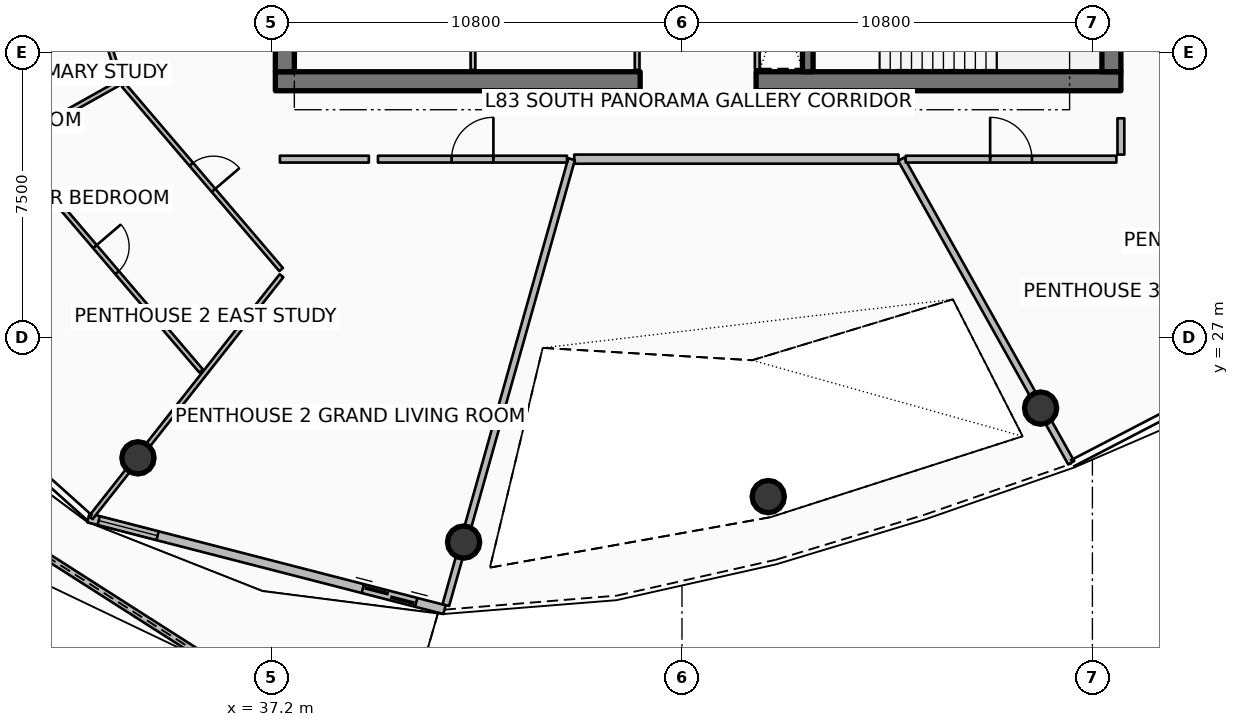
"""IFC4 building model, lengths in metres.
Left out: names, types, materials, properties, quantities, classifications, styles, units other than length and angle.
Written with IfcOpenShell. Run it as: python <this file> out.ifc"""

import sys

from ifc_helpers import new_model, si_unit, direction, frame, frame_2d, origin, origin_2d, place, context, subcontext, project, spatial, polyline, rectangle, circle, outline, extrude, element, fill, save


model = new_model("IFC4")
c1 = context("Model", 3, precision=1e-05, world=origin(), true_north=direction((0.0, 1.0)))
c2 = subcontext(c1, "Body", "Model", "MODEL_VIEW")
j1 = project(units=[si_unit("LENGTHUNIT", "METRE"), si_unit("PLANEANGLEUNIT", "RADIAN")], contexts=[c1])
p1 = place(None, origin())
s1 = spatial("IfcSite", under=j1, at=p1, CompositionType="ELEMENT")
p2 = place(p1, origin())
s2 = spatial("IfcBuilding", under=s1, at=p2, CompositionType="ELEMENT")
p3 = place(p2, frame((0.0, 0.0, 330.5)))
s3 = spatial("IfcBuildingStorey", under=s2, at=p3, CompositionType="ELEMENT", Elevation=330.5)
p4 = place(p3, frame((37.3, 33.75, 0.0), z_axis=(0.0, 0.0, 1.0), x_axis=(1.0, 0.0, 0.0)))
e1 = element("IfcWall", 1, at=p4, inside=s3, PredefinedType="SHEAR", context=c2, shape_type="SweptSolid", body=[
    extrude(rectangle(XDim=9.6, YDim=0.5, at=frame_2d((4.8, 0.0))), origin(), (0.0, 0.0, 1.0), 4.2),
])
p5 = place(p3, frame((49.95, 33.75, 0.0), z_axis=(0.0, 0.0, 1.0), x_axis=(1.0, 0.0, 0.0)))
e2 = element("IfcWall", 2, at=p5, inside=s3, PredefinedType="SHEAR", context=c2, shape_type="SweptSolid", body=[
    extrude(rectangle(XDim=9.6, YDim=0.5, at=frame_2d((4.8, 0.0))), origin(), (0.0, 0.0, 1.0), 4.2),
])
for number, where, z_axis, x_axis in (
    (3, (37.55, 34.0, 0.0), (0.0, 0.0, 1.0), (0.0, 1.0, 0.0)),
    (4, (59.3, 34.0, 0.0), (0.0, 0.0, 1.0), (0.0, 1.0, 0.0)),
):
    element("IfcWall", number, at=place(p3, frame(where, z_axis=z_axis, x_axis=x_axis)), inside=s3, PredefinedType="SHEAR", context=c2, shape_type="SweptSolid", body=[
        extrude(rectangle(XDim=16.0, YDim=0.5, at=frame_2d((8.0, 0.0))), origin(), (0.0, 0.0, 1.0), 4.2),
    ])
p6 = place(p3, frame((51.31, 34.0, 0.0), z_axis=(0.0, 0.0, 1.0), x_axis=(0.0, 1.0, 0.0)))
e5 = element("IfcWall", 5, at=p6, inside=s3, PredefinedType="SHEAR", context=c2, shape_type="SweptSolid", body=[
    extrude(rectangle(XDim=3.5, YDim=0.28, at=frame_2d((1.75, 0.0))), origin(), (0.0, 0.0, 1.0), 4.2),
])
for number, where, z_axis, x_axis in (
    (6, (33.684, 23.841, 0.0), (0.0, 0.0, 1.0), (1.0, 0.0, 0.0)),
    (7, (42.253, 21.624, 0.0), (0.0, 0.0, 1.0), (1.0, 0.0, 0.0)),
):
    element("IfcColumn", number, at=place(p3, frame(where, z_axis=z_axis, x_axis=x_axis)), inside=s3, PredefinedType="COLUMN", context=c2, shape_type="SweptSolid", body=[
        extrude(circle(Radius=0.425, at=origin_2d()), origin(), (0.0, 0.0, 1.0), 3.94),
    ])
p7 = place(p3, frame((50.27, 22.821, 0.0), z_axis=(0.0, 0.0, 1.0), x_axis=(1.0, 0.0, 0.0)))
e8 = element("IfcColumn", 8, at=p7, inside=s3, PredefinedType="COLUMN", context=c2, shape_type="SweptSolid", body=[
    extrude(circle(Radius=0.425, at=origin_2d()), origin(), (0.0, 0.0, 1.0), 4.196),
])
p8 = place(p3, frame((57.437, 25.149, 0.0), z_axis=(0.0, 0.0, 1.0), x_axis=(1.0, 0.0, 0.0)))
e9 = element("IfcColumn", 9, at=p8, inside=s3, PredefinedType="COLUMN", context=c2, shape_type="SweptSolid", body=[
    extrude(circle(Radius=0.425, at=origin_2d()), origin(), (0.0, 0.0, 1.0), 3.94),
])
p9 = place(p3, frame((27.093, 23.922, 0.0), z_axis=(0.0, 0.0, 1.0), x_axis=(0.842921526724, -0.538036522725, 0.0)))
e10 = element("IfcWall", 10, at=p9, inside=s3, PredefinedType="PARAPET", context=c2, shape_type="SweptSolid", body=[
    extrude(outline(polyline([(0.0, 0.0), (10.35, 0.0), (10.35, 1.632), (5.175, 1.418), (0.0, 1.233), (0.0, 0.0)])), frame((0.0, 0.09, 0.0), z_axis=(0.0, -1.0, 0.0), x_axis=(1.0, 0.0, 0.0)), (0.0, 0.0, 1.0), 0.18),
])
p10 = place(p3, frame((32.38, 22.26, 0.0), z_axis=(0.0, 0.0, 1.0), x_axis=(0.968389062354, -0.249444630957, 0.0)))
e11 = element("IfcWall", 11, at=p10, inside=s3, PredefinedType="SOLIDWALL", context=c2, shape_type="SweptSolid", body=[
    extrude(rectangle(XDim=9.678, YDim=0.24, at=frame_2d((4.839, 0.0))), origin(), (0.0, 0.0, 1.0), 2.89),
])
p11 = place(p10, frame((7.458, 0.0, 0.0)))
e12 = element("IfcOpeningElement", 12, at=p11, cuts=e11, PredefinedType="OPENING", context=c2, shape_type="SweptSolid", body=[
    extrude(rectangle(XDim=1.45, YDim=2.15, at=frame_2d((0.725, 1.075))), frame((0.0, 0.13, 0.0), z_axis=(0.0, -1.0, 0.0), x_axis=(1.0, 0.0, 0.0)), (0.0, 0.0, 1.0), 0.26),
])
p12 = place(p10, frame((0.28, 0.0, 0.65)))
e13 = element("IfcOpeningElement", 13, at=p12, cuts=e11, PredefinedType="OPENING", context=c2, shape_type="SweptSolid", body=[
    extrude(rectangle(XDim=1.6, YDim=1.5, at=frame_2d((0.8, 0.75))), frame((0.0, 0.13, 0.0), z_axis=(0.0, -1.0, 0.0), x_axis=(1.0, 0.0, 0.0)), (0.0, 0.0, 1.0), 0.26),
])
for number, where, z_axis, x_axis in (
    (14, (46.82, 34.05, 0.0), (0.0, 0.0, 1.0), (0.0, 1.0, 0.0)),
    (15, (42.5, 34.05, 0.0), (0.0, 0.0, 1.0), (0.0, 1.0, 0.0)),
):
    element("IfcWall", number, at=place(p3, frame(where, z_axis=z_axis, x_axis=x_axis)), inside=s3, PredefinedType="PARTITIONING", context=c2, shape_type="SweptSolid", body=[
        extrude(rectangle(XDim=2.03, YDim=0.125, at=frame_2d((1.015, 0.0))), origin(), (0.0, 0.0, 1.0), 3.38),
    ])
p13 = place(p3, frame((49.98, 34.06, 0.0), z_axis=(0.0, 0.0, 1.0), x_axis=(0.0, 1.0, 0.0)))
e16 = element("IfcWall", 16, at=p13, inside=s3, PredefinedType="PARTITIONING", context=c2, shape_type="SweptSolid", body=[
    extrude(rectangle(XDim=3.4, YDim=0.125, at=frame_2d((1.7, 0.0))), origin(), (0.0, 0.0, 1.0), 3.38),
])
p14 = place(p3, frame((45.165, 31.7, 0.0), z_axis=(0.0, 0.0, 1.0), x_axis=(1.0, 0.0, 0.0)))
e17 = element("IfcWall", 17, at=p14, inside=s3, PredefinedType="SOLIDWALL", context=c2, shape_type="SweptSolid", body=[
    extrude(rectangle(XDim=8.533, YDim=0.24, at=frame_2d((4.267, 0.0))), origin(), (0.0, 0.0, 1.0), 3.38),
])
p15 = place(p3, frame((45.095, 31.7, 0.0), z_axis=(0.0, 0.0, 1.0), x_axis=(-0.271453030279, -0.962451688321, 0.0)))
e18 = element("IfcWall", 18, at=p15, inside=s3, PredefinedType="PARTITIONING", context=c2, shape_type="SweptSolid", body=[
    extrude(rectangle(XDim=12.191, YDim=0.18, at=frame_2d((6.096, 0.0))), origin(), (0.0, 0.0, 1.0), 3.38),
])
p16 = place(p3, frame((53.768, 31.7, 0.0), z_axis=(0.0, 0.0, 1.0), x_axis=(0.488623665245, -0.872494649704, 0.0)))
e19 = element("IfcWall", 19, at=p16, inside=s3, PredefinedType="PARTITIONING", context=c2, shape_type="SweptSolid", body=[
    extrude(rectangle(XDim=9.157, YDim=0.18, at=frame_2d((4.579, 0.0))), origin(), (0.0, 0.0, 1.0), 3.38),
])
p17 = place(p3, frame((40.0, 31.7, 0.0), z_axis=(0.0, 0.0, 1.0), x_axis=(1.0, 0.0, 0.0)))
e20 = element("IfcWall", 20, at=p17, inside=s3, PredefinedType="PARTITIONING", context=c2, shape_type="SweptSolid", body=[
    extrude(rectangle(XDim=4.975, YDim=0.18, at=frame_2d((2.488, 0.0))), origin(), (0.0, 0.0, 1.0), 3.38),
])
p18 = place(p17, frame((1.938, 0.0, 0.0)))
e21 = element("IfcOpeningElement", 21, at=p18, cuts=e20, PredefinedType="OPENING", context=c2, shape_type="SweptSolid", body=[
    extrude(rectangle(XDim=1.1, YDim=2.1, at=frame_2d((0.55, 1.05))), frame((0.0, 0.1, 0.0), z_axis=(0.0, -1.0, 0.0), x_axis=(1.0, 0.0, 0.0)), (0.0, 0.0, 1.0), 0.2),
])
p19 = place(p3, frame((31.229, 39.906, 0.0), z_axis=(0.0, 0.0, 1.0), x_axis=(0.309023798792, -0.951054305379, 0.0)))
e22 = element("IfcWall", 22, at=p19, inside=s3, PredefinedType="PARTITIONING", context=c2, shape_type="SweptSolid", body=[
    extrude(rectangle(XDim=6.383, YDim=0.125, at=frame_2d((3.191, 0.0))), origin(), (0.0, 0.0, 1.0), 3.38),
])
p20 = place(p19, frame((2.741, 0.0, 0.0)))
e23 = element("IfcOpeningElement", 23, at=p20, cuts=e22, PredefinedType="OPENING", context=c2, shape_type="SweptSolid", body=[
    extrude(rectangle(XDim=0.9, YDim=2.08, at=frame_2d((0.45, 1.04))), frame((0.0, 0.073, 0.0), z_axis=(0.0, -1.0, 0.0), x_axis=(1.0, 0.0, 0.0)), (0.0, 0.0, 1.0), 0.145),
])
p21 = place(p3, frame((37.42, 31.7, 0.0), z_axis=(0.0, 0.0, 1.0), x_axis=(1.0, 0.0, 0.0)))
e24 = element("IfcWall", 24, at=p21, inside=s3, PredefinedType="PARTITIONING", context=c2, shape_type="SweptSolid", body=[
    extrude(rectangle(XDim=2.34, YDim=0.18, at=frame_2d((1.17, 0.0))), origin(), (0.0, 0.0, 1.0), 3.38),
])
p22 = place(p3, frame((33.148, 33.683, 0.0), z_axis=(0.0, 0.0, 1.0), x_axis=(-0.872504598877, -0.488605899409, 0.0)))
e25 = element("IfcWall", 25, at=p22, inside=s3, PredefinedType="PARTITIONING", context=c2, shape_type="SweptSolid", body=[
    extrude(rectangle(XDim=8.814, YDim=0.125, at=frame_2d((4.407, 0.0))), origin(), (0.0, 0.0, 1.0), 3.38),
])
p23 = place(p3, frame((37.462, 28.632, 0.0), z_axis=(0.0, 0.0, 1.0), x_axis=(-0.619099165969, -0.78531281837, 0.0)))
e26 = element("IfcWall", 26, at=p23, inside=s3, PredefinedType="PARTITIONING", context=c2, shape_type="SweptSolid", body=[
    extrude(rectangle(XDim=8.105, YDim=0.125, at=frame_2d((4.052, 0.0))), origin(), (0.0, 0.0, 1.0), 3.38),
])
p24 = place(p3, frame((33.307, 33.648, 0.0), z_axis=(0.0, 0.0, 1.0), x_axis=(0.649467421322, -0.760389419075, 0.0)))
e27 = element("IfcWall", 27, at=p24, inside=s3, PredefinedType="PARTITIONING", context=c2, shape_type="SweptSolid", body=[
    extrude(rectangle(XDim=6.383, YDim=0.125, at=frame_2d((3.191, 0.0))), origin(), (0.0, 0.0, 1.0), 3.38),
])
p25 = place(p24, frame((2.741, 0.0, 0.0)))
e28 = element("IfcOpeningElement", 28, at=p25, cuts=e27, PredefinedType="OPENING", context=c2, shape_type="SweptSolid", body=[
    extrude(rectangle(XDim=0.9, YDim=2.08, at=frame_2d((0.45, 1.04))), frame((0.0, 0.073, 0.0), z_axis=(0.0, -1.0, 0.0), x_axis=(1.0, 0.0, 0.0)), (0.0, 0.0, 1.0), 0.145),
])
p26 = place(p3, frame((30.341, 31.987, 0.0), z_axis=(0.0, 0.0, 1.0), x_axis=(0.649457620817, -0.760397789819, 0.0)))
e29 = element("IfcWall", 29, at=p26, inside=s3, PredefinedType="PARTITIONING", context=c2, shape_type="SweptSolid", body=[
    extrude(rectangle(XDim=7.709, YDim=0.125, at=frame_2d((3.854, 0.0))), origin(), (0.0, 0.0, 1.0), 3.38),
])
p27 = place(p26, frame((3.405, 0.0, 0.0)))
e30 = element("IfcOpeningElement", 30, at=p27, cuts=e29, PredefinedType="OPENING", context=c2, shape_type="SweptSolid", body=[
    extrude(rectangle(XDim=0.9, YDim=2.08, at=frame_2d((0.45, 1.04))), frame((0.0, 0.073, 0.0), z_axis=(0.0, -1.0, 0.0), x_axis=(1.0, 0.0, 0.0)), (0.0, 0.0, 1.0), 0.145),
])
p28 = place(p3, frame((53.888, 31.7, 0.0), z_axis=(0.0, 0.0, 1.0), x_axis=(1.0, 0.0, 0.0)))
e31 = element("IfcWall", 31, at=p28, inside=s3, PredefinedType="PARTITIONING", context=c2, shape_type="SweptSolid", body=[
    extrude(rectangle(XDim=5.542, YDim=0.18, at=frame_2d((2.771, 0.0))), origin(), (0.0, 0.0, 1.0), 3.38),
])
p29 = place(p28, frame((2.221, 0.0, 0.0)))
e32 = element("IfcOpeningElement", 32, at=p29, cuts=e31, PredefinedType="OPENING", context=c2, shape_type="SweptSolid", body=[
    extrude(rectangle(XDim=1.1, YDim=2.1, at=frame_2d((0.55, 1.05))), frame((0.0, 0.1, 0.0), z_axis=(0.0, -1.0, 0.0), x_axis=(1.0, 0.0, 0.0)), (0.0, 0.0, 1.0), 0.2),
])
p30 = place(p3, frame((59.55, 31.82, 0.0), z_axis=(0.0, 0.0, 1.0), x_axis=(0.0, 1.0, 0.0)))
e33 = element("IfcWall", 33, at=p30, inside=s3, PredefinedType="PARTITIONING", context=c2, shape_type="SweptSolid", body=[
    extrude(rectangle(XDim=0.955, YDim=0.18, at=frame_2d((0.477, 0.0))), origin(), (0.0, 0.0, 1.0), 3.38),
])
p31 = place(p11, origin())
e34 = element("IfcDoor", 34, at=p31, inside=s3, OperationType="DOUBLE_DOOR_SLIDING", PredefinedType="DOOR", context=c2, shape_type="SweptSolid", body=[
    extrude(rectangle(XDim=1.45, YDim=2.15, at=frame_2d((0.725, 1.075))), frame((0.0, 0.025, 0.0), z_axis=(0.0, -1.0, 0.0), x_axis=(1.0, 0.0, 0.0)), (0.0, 0.0, 1.0), 0.05),
])
fill(e12, e34)
p32 = place(p12, origin())
e35 = element("IfcWindow", 35, at=p32, inside=s3, PartitioningType="SINGLE_PANEL", PredefinedType="WINDOW", context=c2, shape_type="SweptSolid", body=[
    extrude(rectangle(XDim=1.6, YDim=1.5, at=frame_2d((0.8, 0.75))), frame((0.0, 0.03, 0.0), z_axis=(0.0, -1.0, 0.0), x_axis=(1.0, 0.0, 0.0)), (0.0, 0.0, 1.0), 0.06),
])
fill(e13, e35)
p33 = place(p18, origin())
e36 = element("IfcDoor", 36, at=p33, inside=s3, OperationType="SINGLE_SWING_RIGHT", PredefinedType="DOOR", context=c2, shape_type="SweptSolid", body=[
    extrude(rectangle(XDim=1.1, YDim=2.1, at=frame_2d((0.55, 1.05))), frame((0.0, 0.025, 0.0), z_axis=(0.0, -1.0, 0.0), x_axis=(1.0, 0.0, 0.0)), (0.0, 0.0, 1.0), 0.05),
])
fill(e21, e36)
p34 = place(p25, origin())
e37 = element("IfcDoor", 37, at=p34, inside=s3, OperationType="SINGLE_SWING_RIGHT", PredefinedType="DOOR", context=c2, shape_type="SweptSolid", body=[
    extrude(rectangle(XDim=0.9, YDim=2.08, at=frame_2d((0.45, 1.04))), frame((0.0, 0.025, 0.0), z_axis=(0.0, -1.0, 0.0), x_axis=(1.0, 0.0, 0.0)), (0.0, 0.0, 1.0), 0.05),
])
fill(e28, e37)
p35 = place(p27, origin())
e38 = element("IfcDoor", 38, at=p35, inside=s3, OperationType="SINGLE_SWING_LEFT", PredefinedType="DOOR", context=c2, shape_type="SweptSolid", body=[
    extrude(rectangle(XDim=0.9, YDim=2.08, at=frame_2d((0.45, 1.04))), frame((0.0, 0.025, 0.0), z_axis=(0.0, -1.0, 0.0), x_axis=(1.0, 0.0, 0.0)), (0.0, 0.0, 1.0), 0.05),
])
fill(e30, e38)
p36 = place(p29, origin())
e39 = element("IfcDoor", 39, at=p36, inside=s3, OperationType="SINGLE_SWING_LEFT", PredefinedType="DOOR", context=c2, shape_type="SweptSolid", body=[
    extrude(rectangle(XDim=1.1, YDim=2.1, at=frame_2d((0.55, 1.05))), frame((0.0, 0.025, 0.0), z_axis=(0.0, -1.0, 0.0), x_axis=(1.0, 0.0, 0.0)), (0.0, 0.0, 1.0), 0.05),
])
fill(e32, e39)
save(model, sys.argv[1])
